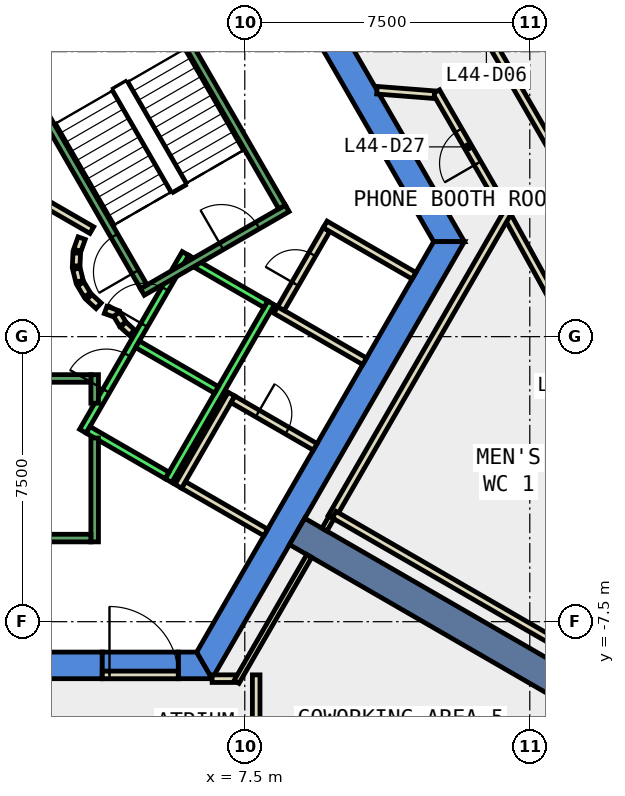
"""IFC4 building model, lengths in metres.
Left out: names, types, materials, properties, quantities, classifications, styles, units other than length and angle.
Written with IfcOpenShell. Run it as: python <this file> out.ifc"""

import sys

from ifc_helpers import new_model, si_unit, direction, frame, frame_2d, origin, place, context, subcontext, project, spatial, polyline, rectangle, outline, extrude, element, fill, save


model = new_model("IFC4")
c1 = context("Model", 3, precision=1e-05, world=origin(), true_north=direction((0.0, 1.0)))
c2 = subcontext(c1, "Body", "Model", "MODEL_VIEW")
j1 = project(units=[si_unit("LENGTHUNIT", "METRE"), si_unit("PLANEANGLEUNIT", "RADIAN")], contexts=[c1])
p1 = place(None, origin())
s1 = spatial("IfcSite", under=j1, at=p1, CompositionType="ELEMENT")
p2 = place(p1, origin())
s2 = spatial("IfcBuilding", under=s1, at=p2, CompositionType="ELEMENT")
p3 = place(p2, frame((0.0, 0.0, 198.2)))
s3 = spatial("IfcBuildingStorey", under=s2, at=p3, CompositionType="ELEMENT", Elevation=198.2)
p4 = place(p3, frame((0.0, 0.0, -0.4)))
e1 = element("IfcWall", 1, at=p4, inside=s3, PredefinedType="SHEAR", context=c2, shape_type="SweptSolid", body=[
    extrude(outline(polyline([(8.084, 11.498), (7.478, 11.148), (12.471, 2.5), (13.279, 2.5), (8.084, 11.498)])), origin(), (0.0, 0.0, 1.0), 4.2),
])
p5 = place(p3, frame((0.0, 0.0, -0.4)))
e2 = element("IfcWall", 2, at=p5, inside=s3, PredefinedType="SHEAR", context=c2, shape_type="SweptSolid", body=[
    extrude(outline(polyline([(3.75, -9.0), (3.75, -8.3), (-6.235, -8.3), (-6.64, -9.0), (3.75, -9.0)])), origin(), (0.0, 0.0, 1.0), 4.2),
])
p6 = place(p3, frame((0.0, 0.0, -0.4)))
e3 = element("IfcWall", 3, at=p6, inside=s3, PredefinedType="SHEAR", context=c2, shape_type="SweptSolid", body=[
    extrude(outline(polyline([(5.75, -8.3), (5.75, -9.0), (6.64, -9.0), (6.235, -8.3), (5.75, -8.3)])), origin(), (0.0, 0.0, 1.0), 4.2),
])
p7 = place(p3, frame((0.0, 0.0, 3.6)))
e4 = element("IfcWall", 4, at=p7, inside=s3, PredefinedType="SHEAR", context=c2, shape_type="SweptSolid", body=[
    extrude(outline(polyline([(5.75, -9.0), (5.75, -8.3), (3.75, -8.3), (3.75, -9.0), (5.75, -9.0)])), origin(), (0.0, 0.0, 1.0), 0.2),
])
p8 = place(p3, frame((0.0, 0.0, -0.4)))
e5 = element("IfcWall", 5, at=p8, inside=s3, PredefinedType="SHEAR", context=c2, shape_type="SweptSolid", body=[
    extrude(outline(polyline([(6.64, -9.0), (13.279, 2.5), (12.471, 2.5), (6.235, -8.3), (6.64, -9.0)])), origin(), (0.0, 0.0, 1.0), 4.2),
])
p9 = place(p3, frame((8.877, -5.125, -0.4), z_axis=(0.0, 0.0, 1.0), x_axis=(0.866017533419, -0.500013631625, 0.0)))
e6 = element("IfcWall", 6, at=p9, inside=s3, PredefinedType="SHEAR", context=c2, shape_type="SweptSolid", body=[
    extrude(rectangle(XDim=9.0, YDim=0.8, at=frame_2d((4.5, 0.0))), origin(), (0.0, 0.0, 1.0), 4.2),
])
p10 = place(p3, frame((14.213, 3.543, 0.0), z_axis=(0.0, 0.0, 1.0), x_axis=(-0.500182898346, 0.865919781621, 0.0)))
e7 = element("IfcWall", 7, at=p10, inside=s3, PredefinedType="PARTITIONING", context=c2, shape_type="SweptSolid", body=[
    extrude(rectangle(XDim=3.35, YDim=0.2, at=frame_2d((1.675, 0.0))), origin(), (0.0, 0.0, 1.0), 3.8),
])
p11 = place(p10, frame((1.175, 0.0, 0.0)))
e8 = element("IfcOpeningElement", 8, at=p11, cuts=e7, PredefinedType="OPENING", context=c2, shape_type="SweptSolid", body=[
    extrude(rectangle(XDim=1.0, YDim=2.1, at=frame_2d((0.5, 1.05))), frame((0.0, 0.11, 0.0), z_axis=(0.0, -1.0, 0.0), x_axis=(1.0, 0.0, 0.0)), (0.0, 0.0, 1.0), 0.22),
])
p12 = place(p3, frame((12.488, 6.366, 0.0), z_axis=(0.0, 0.0, 1.0), x_axis=(-0.996960771308, 0.077905201835, 0.0)))
e9 = element("IfcWall", 9, at=p12, inside=s3, PredefinedType="PARTITIONING", context=c2, shape_type="SweptSolid", body=[
    extrude(rectangle(XDim=1.514, YDim=0.2, at=frame_2d((0.757, 0.0))), origin(), (0.0, 0.0, 1.0), 3.8),
])
p13 = place(p3, frame((18.112, -3.531, 0.0), z_axis=(0.0, 0.0, 1.0), x_axis=(-0.482800061144, 0.875730609811, 0.0)))
e10 = element("IfcWall", 10, at=p13, inside=s3, PredefinedType="PARTITIONING", context=c2, shape_type="SweptSolid", body=[
    extrude(rectangle(XDim=7.612, YDim=0.2, at=frame_2d((3.806, 0.0))), origin(), (0.0, 0.0, 1.0), 3.8),
])
p14 = place(p13, frame((3.306, 0.0, 0.0)))
e11 = element("IfcOpeningElement", 11, at=p14, cuts=e10, PredefinedType="OPENING", context=c2, shape_type="SweptSolid", body=[
    extrude(rectangle(XDim=1.0, YDim=2.1, at=frame_2d((0.5, 1.05))), frame((0.0, 0.11, 0.0), z_axis=(0.0, -1.0, 0.0), x_axis=(1.0, 0.0, 0.0)), (0.0, 0.0, 1.0), 0.22),
])
p15 = place(p3, frame((11.811, 11.503, 0.0), z_axis=(0.0, 0.0, 1.0), x_axis=(0.500013420409, -0.866017655369, 0.0)))
e12 = element("IfcWall", 12, at=p15, inside=s3, PredefinedType="PARTITIONING", context=c2, shape_type="SweptSolid", body=[
    extrude(rectangle(XDim=8.038, YDim=0.2, at=frame_2d((4.019, 0.0))), origin(), (0.0, 0.0, 1.0), 3.8),
])
p16 = place(p15, frame((3.594, 0.0, 0.0)))
e13 = element("IfcOpeningElement", 13, at=p16, cuts=e12, PredefinedType="OPENING", context=c2, shape_type="SweptSolid", body=[
    extrude(rectangle(XDim=1.0, YDim=2.1, at=frame_2d((0.5, 1.05))), frame((0.0, 0.11, 0.0), z_axis=(0.0, -1.0, 0.0), x_axis=(1.0, 0.0, 0.0)), (0.0, 0.0, 1.0), 0.22),
])
p17 = place(p3, frame((8.053, -5.152, 0.0), z_axis=(0.0, 0.0, 1.0), x_axis=(-0.866022959057, 0.500004234368, 0.0)))
e14 = element("IfcWall", 14, at=p17, inside=s3, PredefinedType="PARTITIONING", context=c2, shape_type="SweptSolid", body=[
    extrude(rectangle(XDim=2.5, YDim=0.2, at=frame_2d((1.25, 0.0))), origin(), (0.0, 0.0, 1.0), 3.8),
])
p18 = place(p3, frame((5.751, -3.938, 0.0), z_axis=(0.0, 0.0, 1.0), x_axis=(0.49994636267, 0.866056369097, 0.0)))
e15 = element("IfcWall", 15, at=p18, inside=s3, PredefinedType="PARTITIONING", context=c2, shape_type="SweptSolid", body=[
    extrude(rectangle(XDim=2.8, YDim=0.2, at=frame_2d((1.4, 0.0))), origin(), (0.0, 0.0, 1.0), 3.8),
])
p19 = place(p3, frame((7.188, -1.65, 0.0), z_axis=(0.0, 0.0, 1.0), x_axis=(0.866022959057, -0.500004234368, 0.0)))
e16 = element("IfcWall", 16, at=p19, inside=s3, PredefinedType="PARTITIONING", context=c2, shape_type="SweptSolid", body=[
    extrude(rectangle(XDim=2.5, YDim=0.2, at=frame_2d((1.25, 0.0))), origin(), (0.0, 0.0, 1.0), 3.8),
])
p20 = place(p19, frame((0.75, 0.0, 0.0)))
e17 = element("IfcOpeningElement", 17, at=p20, cuts=e16, PredefinedType="OPENING", context=c2, shape_type="SweptSolid", body=[
    extrude(rectangle(XDim=0.9, YDim=2.1, at=frame_2d((0.45, 1.05))), frame((0.0, 0.11, 0.0), z_axis=(0.0, -1.0, 0.0), x_axis=(1.0, 0.0, 0.0)), (0.0, 0.0, 1.0), 0.22),
])
p21 = place(p3, frame((10.653, -0.648, 0.0), z_axis=(0.0, 0.0, 1.0), x_axis=(-0.866036505625, 0.499980770555, 0.0)))
e18 = element("IfcWall", 18, at=p21, inside=s3, PredefinedType="PARTITIONING", context=c2, shape_type="SweptSolid", body=[
    extrude(rectangle(XDim=2.7, YDim=0.2, at=frame_2d((1.35, 0.0))), origin(), (0.0, 0.0, 1.0), 3.8),
])
p22 = place(p3, frame((8.451, 0.738, 0.0), z_axis=(0.0, 0.0, 1.0), x_axis=(0.499913221443, 0.866075499611, 0.0)))
e19 = element("IfcWall", 19, at=p22, inside=s3, PredefinedType="PARTITIONING", context=c2, shape_type="SweptSolid", body=[
    extrude(rectangle(XDim=2.4, YDim=0.2, at=frame_2d((1.2, 0.0))), origin(), (0.0, 0.0, 1.0), 3.8),
])
p23 = place(p22, frame((0.75, 0.0, 0.0)))
e20 = element("IfcOpeningElement", 20, at=p23, cuts=e19, PredefinedType="OPENING", context=c2, shape_type="SweptSolid", body=[
    extrude(rectangle(XDim=0.9, YDim=2.1, at=frame_2d((0.45, 1.05))), frame((0.0, 0.11, 0.0), z_axis=(0.0, -1.0, 0.0), x_axis=(1.0, 0.0, 0.0)), (0.0, 0.0, 1.0), 0.22),
])
p24 = place(p3, frame((9.615, 2.953, 0.0), z_axis=(0.0, 0.0, 1.0), x_axis=(0.866013897511, -0.50001992892, 0.0)))
e21 = element("IfcWall", 21, at=p24, inside=s3, PredefinedType="PARTITIONING", context=c2, shape_type="SweptSolid", body=[
    extrude(rectangle(XDim=2.7, YDim=0.2, at=frame_2d((1.35, 0.0))), origin(), (0.0, 0.0, 1.0), 3.8),
])
p25 = place(p3, frame((6.641, -8.999, 0.0), z_axis=(0.0, 0.0, 1.0), x_axis=(1.0, 0.0, 0.0)))
e22 = element("IfcWall", 22, at=p25, inside=s3, PredefinedType="PARTITIONING", context=c2, shape_type="SweptSolid", body=[
    extrude(rectangle(XDim=0.617, YDim=0.2, at=frame_2d((0.309, 0.0))), origin(), (0.0, 0.0, 1.0), 3.8),
])
p26 = place(p3, frame((7.283, -9.086, 0.0), z_axis=(0.0, 0.0, 1.0), x_axis=(0.499843936326, 0.866115488442, 0.0)))
e23 = element("IfcWall", 23, at=p26, inside=s3, PredefinedType="PARTITIONING", context=c2, shape_type="SweptSolid", body=[
    extrude(rectangle(XDim=3.827, YDim=0.15, at=frame_2d((1.914, 0.0))), origin(), (0.0, 0.0, 1.0), 3.8),
])
p27 = place(p3, frame((9.781, -4.758, 0.0), z_axis=(0.0, 0.0, 1.0), x_axis=(0.50003174578, 0.866007074574, 0.0)))
e24 = element("IfcWall", 24, at=p27, inside=s3, PredefinedType="PARTITIONING", context=c2, shape_type="SweptSolid", body=[
    extrude(rectangle(XDim=9.315, YDim=0.2, at=frame_2d((4.658, 0.0))), origin(), (0.0, 0.0, 1.0), 3.8),
])
p28 = place(p3, frame((1.866, 3.732, 0.0), z_axis=(0.0, 0.0, 1.0), x_axis=(0.866043361281, -0.499968895414, 0.0)))
e25 = element("IfcWall", 25, at=p28, inside=s3, PredefinedType="PARTITIONING", context=c2, shape_type="SweptSolid", body=[
    extrude(rectangle(XDim=1.858, YDim=0.2, at=frame_2d((0.929, 0.0))), origin(), (0.0, 0.0, 1.0), 3.8),
])
p29 = place(p3, frame((3.208, 2.592, 0.0), z_axis=(0.0, 0.0, 1.0), x_axis=(-0.337388820924, -0.941365382578, 0.0)))
e26 = element("IfcWall", 26, at=p29, inside=s3, PredefinedType="PARTITIONING", context=c2, shape_type="SweptSolid", body=[
    extrude(rectangle(XDim=0.338, YDim=0.2, at=frame_2d((0.169, 0.0))), origin(), (0.0, 0.0, 1.0), 3.8),
])
p30 = place(p3, frame((3.079, 2.199, 0.0), z_axis=(0.0, 0.0, 1.0), x_axis=(-0.047771483479, -0.998858290933, 0.0)))
e27 = element("IfcWall", 27, at=p30, inside=s3, PredefinedType="PARTITIONING", context=c2, shape_type="SweptSolid", body=[
    extrude(rectangle(XDim=0.337, YDim=0.2, at=frame_2d((0.169, 0.0))), origin(), (0.0, 0.0, 1.0), 3.8),
])
p31 = place(p3, frame((3.07, 1.786, 0.0), z_axis=(0.0, 0.0, 1.0), x_axis=(0.242705583207, -0.970099994784, 0.0)))
e28 = element("IfcWall", 28, at=p31, inside=s3, PredefinedType="PARTITIONING", context=c2, shape_type="SweptSolid", body=[
    extrude(rectangle(XDim=0.338, YDim=0.2, at=frame_2d((0.169, 0.0))), origin(), (0.0, 0.0, 1.0), 3.8),
])
for number, where, z_axis, x_axis in (
    (29, (3.182, 1.388, 0.0), (0.0, 0.0, 1.0), (0.512, -0.859, 0.0)),
    (30, (3.404, 1.039, 0.0), (0.0, 0.0, 1.0), (0.74, -0.672, 0.0)),
):
    element("IfcWall", number, at=place(p3, frame(where, z_axis=z_axis, x_axis=x_axis)), inside=s3, PredefinedType="PARTITIONING", context=c2, shape_type="SweptSolid", body=[
        extrude(rectangle(XDim=0.338, YDim=0.2, at=frame_2d((0.169, 0.0))), origin(), (0.0, 0.0, 1.0), 3.8),
    ])
p32 = place(p3, frame((3.838, 0.702, 0.0), z_axis=(0.0, 0.0, 1.0), x_axis=(0.941035081519, -0.338308993895, 0.0)))
e31 = element("IfcWall", 31, at=p32, inside=s3, PredefinedType="PARTITIONING", context=c2, shape_type="SweptSolid", body=[
    extrude(rectangle(XDim=0.337, YDim=0.2, at=frame_2d((0.168, 0.0))), origin(), (0.0, 0.0, 1.0), 3.8),
])
p33 = place(p3, frame((4.132, 0.593, 0.0), z_axis=(0.0, 0.0, 1.0), x_axis=(0.513561617048, -0.858052717201, 0.0)))
e32 = element("IfcWall", 32, at=p33, inside=s3, PredefinedType="PARTITIONING", context=c2, shape_type="SweptSolid", body=[
    extrude(rectangle(XDim=0.308, YDim=0.2, at=frame_2d((0.154, 0.0))), origin(), (0.0, 0.0, 1.0), 3.8),
])
p34 = place(p3, frame((4.301, 0.315, 0.0), z_axis=(0.0, 0.0, 1.0), x_axis=(0.741798017506, -0.670623367639, 0.0)))
e33 = element("IfcWall", 33, at=p34, inside=s3, PredefinedType="PARTITIONING", context=c2, shape_type="SweptSolid", body=[
    extrude(rectangle(XDim=0.309, YDim=0.2, at=frame_2d((0.154, 0.0))), origin(), (0.0, 0.0, 1.0), 3.8),
])
p35 = place(p3, frame((7.8, -8.899, 0.0), z_axis=(0.0, 0.0, 1.0), x_axis=(0.0, -1.0, 0.0)))
e34 = element("IfcWall", 34, at=p35, inside=s3, PredefinedType="PARTITIONING", context=c2, shape_type="SweptSolid", body=[
    extrude(rectangle(XDim=5.025, YDim=0.2, at=frame_2d((2.513, 0.0))), origin(), (0.0, 0.0, 1.0), 3.8),
])
p36 = place(p3, frame((9.853, -4.684, 0.0), z_axis=(0.0, 0.0, 1.0), x_axis=(0.865999791918, -0.500044358431, 0.0)))
e35 = element("IfcWall", 35, at=p36, inside=s3, PredefinedType="PARTITIONING", context=c2, shape_type="SweptSolid", body=[
    extrude(rectangle(XDim=8.075, YDim=0.2, at=frame_2d((4.038, 0.0))), origin(), (0.0, 0.0, 1.0), 3.8),
])
p37 = place(p3, frame((16.125, -9.771, 0.0), z_axis=(0.0, 0.0, 1.0), x_axis=(-0.500030759312, -0.866007644159, 0.0)))
e36 = element("IfcWall", 36, at=p37, inside=s3, PredefinedType="PARTITIONING", context=c2, shape_type="SweptSolid", body=[
    extrude(rectangle(XDim=4.73, YDim=0.2, at=frame_2d((2.365, 0.0))), origin(), (0.0, 0.0, 1.0), 3.8),
])
p38 = place(p3, frame((3.75, -8.9, 0.0), z_axis=(0.0, 0.0, 1.0), x_axis=(1.0, 0.0, 0.0)))
e37 = element("IfcWall", 37, at=p38, inside=s3, PredefinedType="PARTITIONING", context=c2, shape_type="SweptSolid", body=[
    extrude(rectangle(XDim=2.0, YDim=0.2, at=frame_2d((1.0, 0.0))), origin(), (0.0, 0.0, 1.0), 2.4),
])
p39 = place(p38, frame((0.19, 0.0, 0.0)))
e38 = element("IfcOpeningElement", 38, at=p39, cuts=e37, PredefinedType="OPENING", context=c2, shape_type="SweptSolid", body=[
    extrude(rectangle(XDim=1.8, YDim=2.1, at=frame_2d((0.9, 1.05))), frame((0.0, 0.11, 0.0), z_axis=(0.0, -1.0, 0.0), x_axis=(1.0, 0.0, 0.0)), (0.0, 0.0, 1.0), 0.22),
])
p40 = place(p3, frame((9.596, -5.078, 0.0), z_axis=(0.0, 0.0, 1.0), x_axis=(0.500827895298, 0.86554689029, 0.0)))
e39 = element("IfcWall", 39, at=p40, inside=s3, PredefinedType="PARTITIONING", context=c2, shape_type="SweptSolid", body=[
    extrude(rectangle(XDim=0.369, YDim=0.15, at=frame_2d((0.185, 0.0))), origin(), (0.0, 0.0, 1.0), 3.8),
])
p41 = place(p3, frame((3.24, -2.488, 0.0), z_axis=(0.0, 0.0, 1.0), x_axis=(0.500034260056, 0.866005622828, 0.0)))
e40 = element("IfcWall", 40, at=p41, inside=s3, PredefinedType="STANDARD", context=c2, shape_type="SweptSolid", body=[
    extrude(rectangle(XDim=5.399, YDim=0.2, at=frame_2d((2.7, 0.0))), origin(), (0.0, 0.0, 1.0), 3.8),
])
p42 = place(p41, frame((3.225, 0.0, 0.0)))
e41 = element("IfcOpeningElement", 41, at=p42, cuts=e40, PredefinedType="OPENING", context=c2, shape_type="SweptSolid", body=[
    extrude(rectangle(XDim=1.1, YDim=2.1, at=frame_2d((0.55, 1.05))), frame((0.0, 0.11, 0.0), z_axis=(0.0, -1.0, 0.0), x_axis=(1.0, 0.0, 0.0)), (0.0, 0.0, 1.0), 0.22),
])
p43 = place(p41, frame((1.225, 0.0, 0.0)))
e42 = element("IfcOpeningElement", 42, at=p43, cuts=e40, PredefinedType="OPENING", context=c2, shape_type="SweptSolid", body=[
    extrude(rectangle(XDim=1.1, YDim=2.1, at=frame_2d((0.55, 1.05))), frame((0.0, 0.11, 0.0), z_axis=(0.0, -1.0, 0.0), x_axis=(1.0, 0.0, 0.0)), (0.0, 0.0, 1.0), 0.22),
])
p44 = place(p3, frame((5.492, -3.788, 0.0), z_axis=(0.0, 0.0, 1.0), x_axis=(0.500034260056, 0.866005622828, 0.0)))
e43 = element("IfcWall", 43, at=p44, inside=s3, PredefinedType="STANDARD", context=c2, shape_type="SweptSolid", body=[
    extrude(rectangle(XDim=5.399, YDim=0.2, at=frame_2d((2.7, 0.0))), origin(), (0.0, 0.0, 1.0), 3.8),
])
p45 = place(p3, frame((3.377, -2.452, 0.0), z_axis=(0.0, 0.0, 1.0), x_axis=(0.865955154139, -0.50012165622, 0.0)))
e44 = element("IfcWall", 44, at=p45, inside=s3, PredefinedType="STANDARD", context=c2, shape_type="SweptSolid", body=[
    extrude(rectangle(XDim=2.4, YDim=0.2, at=frame_2d((1.2, 0.0))), origin(), (0.0, 0.0, 1.0), 3.8),
])
for number, where, z_axis, x_axis in (
    (45, (4.677, -0.2, 0.0), (0.0, 0.0, 1.0), (0.866, -0.5, 0.0)),
    (46, (5.977, 2.052, 0.0), (0.0, 0.0, 1.0), (0.866, -0.5, 0.0)),
):
    element("IfcWall", number, at=place(p3, frame(where, z_axis=z_axis, x_axis=x_axis)), inside=s3, PredefinedType="STANDARD", context=c2, shape_type="SweptSolid", body=[
        extrude(rectangle(XDim=2.399, YDim=0.2, at=frame_2d((1.2, 0.0))), origin(), (0.0, 0.0, 1.0), 3.8),
    ])
p46 = place(p3, frame((3.55, -2.667, 0.0), z_axis=(0.0, 0.0, 1.0), x_axis=(0.0, -1.0, 0.0)))
e47 = element("IfcWall", 47, at=p46, inside=s3, PredefinedType="STANDARD", context=c2, shape_type="SweptSolid", body=[
    extrude(rectangle(XDim=2.733, YDim=0.2, at=frame_2d((1.366, 0.0))), origin(), (0.0, 0.0, 1.0), 3.8),
])
p47 = place(p3, frame((3.55, -1.0, 0.0), z_axis=(0.0, 0.0, 1.0), x_axis=(0.0, -1.0, 0.0)))
e48 = element("IfcWall", 48, at=p47, inside=s3, PredefinedType="STANDARD", context=c2, shape_type="SweptSolid", body=[
    extrude(rectangle(XDim=0.751, YDim=0.2, at=frame_2d((0.375, 0.0))), origin(), (0.0, 0.0, 1.0), 3.8),
])
p48 = place(p3, frame((-3.45, -1.1, 0.0), z_axis=(0.0, 0.0, 1.0), x_axis=(1.0, 0.0, 0.0)))
e49 = element("IfcWall", 49, at=p48, inside=s3, PredefinedType="STANDARD", context=c2, shape_type="SweptSolid", body=[
    extrude(rectangle(XDim=6.9, YDim=0.2, at=frame_2d((3.45, 0.0))), origin(), (0.0, 0.0, 1.0), 3.8),
])
p49 = place(p48, frame((0.45, 0.0, 0.0)))
e50 = element("IfcOpeningElement", 50, at=p49, cuts=e49, PredefinedType="OPENING", context=c2, shape_type="SweptSolid", body=[
    extrude(rectangle(XDim=1.1, YDim=2.2, at=frame_2d((0.55, 1.1))), frame((0.0, 0.11, 0.0), z_axis=(0.0, -1.0, 0.0), x_axis=(1.0, 0.0, 0.0)), (0.0, 0.0, 1.0), 0.22),
])
p50 = place(p3, frame((-3.45, -5.3, 0.0), z_axis=(0.0, 0.0, 1.0), x_axis=(1.0, 0.0, 0.0)))
e51 = element("IfcWall", 51, at=p50, inside=s3, PredefinedType="STANDARD", context=c2, shape_type="SweptSolid", body=[
    extrude(rectangle(XDim=6.9, YDim=0.2, at=frame_2d((3.45, 0.0))), origin(), (0.0, 0.0, 1.0), 3.8),
])
p51 = place(p3, frame((4.806, 1.176, 0.0), z_axis=(0.0, 0.0, 1.0), x_axis=(0.866059941101, 0.499940174841, 0.0)))
e52 = element("IfcWall", 52, at=p51, inside=s3, PredefinedType="STANDARD", context=c2, shape_type="SweptSolid", body=[
    extrude(rectangle(XDim=4.4, YDim=0.2, at=frame_2d((2.2, 0.0))), origin(), (0.0, 0.0, 1.0), 3.8),
])
p52 = place(p51, frame((2.4, 0.0, 0.0)))
e53 = element("IfcOpeningElement", 53, at=p52, cuts=e52, PredefinedType="OPENING", context=c2, shape_type="SweptSolid", body=[
    extrude(rectangle(XDim=1.1, YDim=2.2, at=frame_2d((0.55, 1.1))), frame((0.0, 0.11, 0.0), z_axis=(0.0, -1.0, 0.0), x_axis=(1.0, 0.0, 0.0)), (0.0, 0.0, 1.0), 0.22),
])
p53 = place(p3, frame((4.843, 1.312, 0.0), z_axis=(0.0, 0.0, 1.0), x_axis=(-0.499963383562, 0.866046543262, 0.0)))
e54 = element("IfcWall", 54, at=p53, inside=s3, PredefinedType="STANDARD", context=c2, shape_type="SweptSolid", body=[
    extrude(rectangle(XDim=6.9, YDim=0.2, at=frame_2d((3.45, 0.0))), origin(), (0.0, 0.0, 1.0), 3.8),
])
p54 = place(p53, frame((0.45, 0.0, 0.0)))
e55 = element("IfcOpeningElement", 55, at=p54, cuts=e54, PredefinedType="OPENING", context=c2, shape_type="SweptSolid", body=[
    extrude(rectangle(XDim=1.1, YDim=2.2, at=frame_2d((0.55, 1.1))), frame((0.0, 0.11, 0.0), z_axis=(0.0, -1.0, 0.0), x_axis=(1.0, 0.0, 0.0)), (0.0, 0.0, 1.0), 0.22),
])
p55 = place(p3, frame((8.48, 3.412, 0.0), z_axis=(0.0, 0.0, 1.0), x_axis=(-0.499978703459, 0.866037698999, 0.0)))
e56 = element("IfcWall", 56, at=p55, inside=s3, PredefinedType="STANDARD", context=c2, shape_type="SweptSolid", body=[
    extrude(rectangle(XDim=6.9, YDim=0.2, at=frame_2d((3.45, 0.0))), origin(), (0.0, 0.0, 1.0), 3.8),
])
p56 = place(p11, origin())
e57 = element("IfcDoor", 57, at=p56, inside=s3, OperationType="SINGLE_SWING_LEFT", PredefinedType="DOOR", context=c2, shape_type="SweptSolid", body=[
    extrude(rectangle(XDim=1.0, YDim=2.1, at=frame_2d((0.5, 1.05))), frame((0.0, 0.025, 0.0), z_axis=(0.0, -1.0, 0.0), x_axis=(1.0, 0.0, 0.0)), (0.0, 0.0, 1.0), 0.05),
])
fill(e8, e57)
p57 = place(p20, origin())
e58 = element("IfcDoor", 58, at=p57, inside=s3, OperationType="SINGLE_SWING_RIGHT", PredefinedType="DOOR", context=c2, shape_type="SweptSolid", body=[
    extrude(rectangle(XDim=0.9, YDim=2.1, at=frame_2d((0.45, 1.05))), frame((0.0, 0.025, 0.0), z_axis=(0.0, -1.0, 0.0), x_axis=(1.0, 0.0, 0.0)), (0.0, 0.0, 1.0), 0.05),
])
fill(e17, e58)
p58 = place(p23, origin())
e59 = element("IfcDoor", 59, at=p58, inside=s3, OperationType="SINGLE_SWING_LEFT", PredefinedType="DOOR", context=c2, shape_type="SweptSolid", body=[
    extrude(rectangle(XDim=0.9, YDim=2.1, at=frame_2d((0.45, 1.05))), frame((0.0, 0.025, 0.0), z_axis=(0.0, -1.0, 0.0), x_axis=(1.0, 0.0, 0.0)), (0.0, 0.0, 1.0), 0.05),
])
fill(e20, e59)
p59 = place(p39, origin())
e60 = element("IfcDoor", 60, at=p59, inside=s3, OperationType="DOUBLE_DOOR_SINGLE_SWING", PredefinedType="DOOR", context=c2, shape_type="SweptSolid", body=[
    extrude(rectangle(XDim=1.8, YDim=2.1, at=frame_2d((0.9, 1.05))), frame((0.0, 0.025, 0.0), z_axis=(0.0, -1.0, 0.0), x_axis=(1.0, 0.0, 0.0)), (0.0, 0.0, 1.0), 0.05),
])
fill(e38, e60)
p60 = place(p42, origin())
e61 = element("IfcDoor", 61, at=p60, inside=s3, OperationType="SLIDING_TO_LEFT", PredefinedType="DOOR", context=c2, shape_type="SweptSolid", body=[
    extrude(rectangle(XDim=1.1, YDim=2.1, at=frame_2d((0.55, 1.05))), frame((0.0, 0.025, 0.0), z_axis=(0.0, -1.0, 0.0), x_axis=(1.0, 0.0, 0.0)), (0.0, 0.0, 1.0), 0.05),
])
fill(e41, e61)
p61 = place(p43, origin())
e62 = element("IfcDoor", 62, at=p61, inside=s3, OperationType="SLIDING_TO_LEFT", PredefinedType="DOOR", context=c2, shape_type="SweptSolid", body=[
    extrude(rectangle(XDim=1.1, YDim=2.1, at=frame_2d((0.55, 1.05))), frame((0.0, 0.025, 0.0), z_axis=(0.0, -1.0, 0.0), x_axis=(1.0, 0.0, 0.0)), (0.0, 0.0, 1.0), 0.05),
])
fill(e42, e62)
p62 = place(p54, origin())
e63 = element("IfcDoor", 63, at=p62, inside=s3, OperationType="SINGLE_SWING_LEFT", PredefinedType="DOOR", context=c2, shape_type="SweptSolid", body=[
    extrude(rectangle(XDim=1.1, YDim=2.2, at=frame_2d((0.55, 1.1))), frame((0.0, 0.025, 0.0), z_axis=(0.0, -1.0, 0.0), x_axis=(1.0, 0.0, 0.0)), (0.0, 0.0, 1.0), 0.05),
])
fill(e55, e63)
p63 = place(p52, origin())
e64 = element("IfcDoor", 64, at=p63, inside=s3, OperationType="SINGLE_SWING_LEFT", PredefinedType="DOOR", context=c2, shape_type="SweptSolid", body=[
    extrude(rectangle(XDim=1.1, YDim=2.2, at=frame_2d((0.55, 1.1))), frame((0.0, 0.025, 0.0), z_axis=(0.0, -1.0, 0.0), x_axis=(1.0, 0.0, 0.0)), (0.0, 0.0, 1.0), 0.05),
])
fill(e53, e64)
save(model, sys.argv[1])
